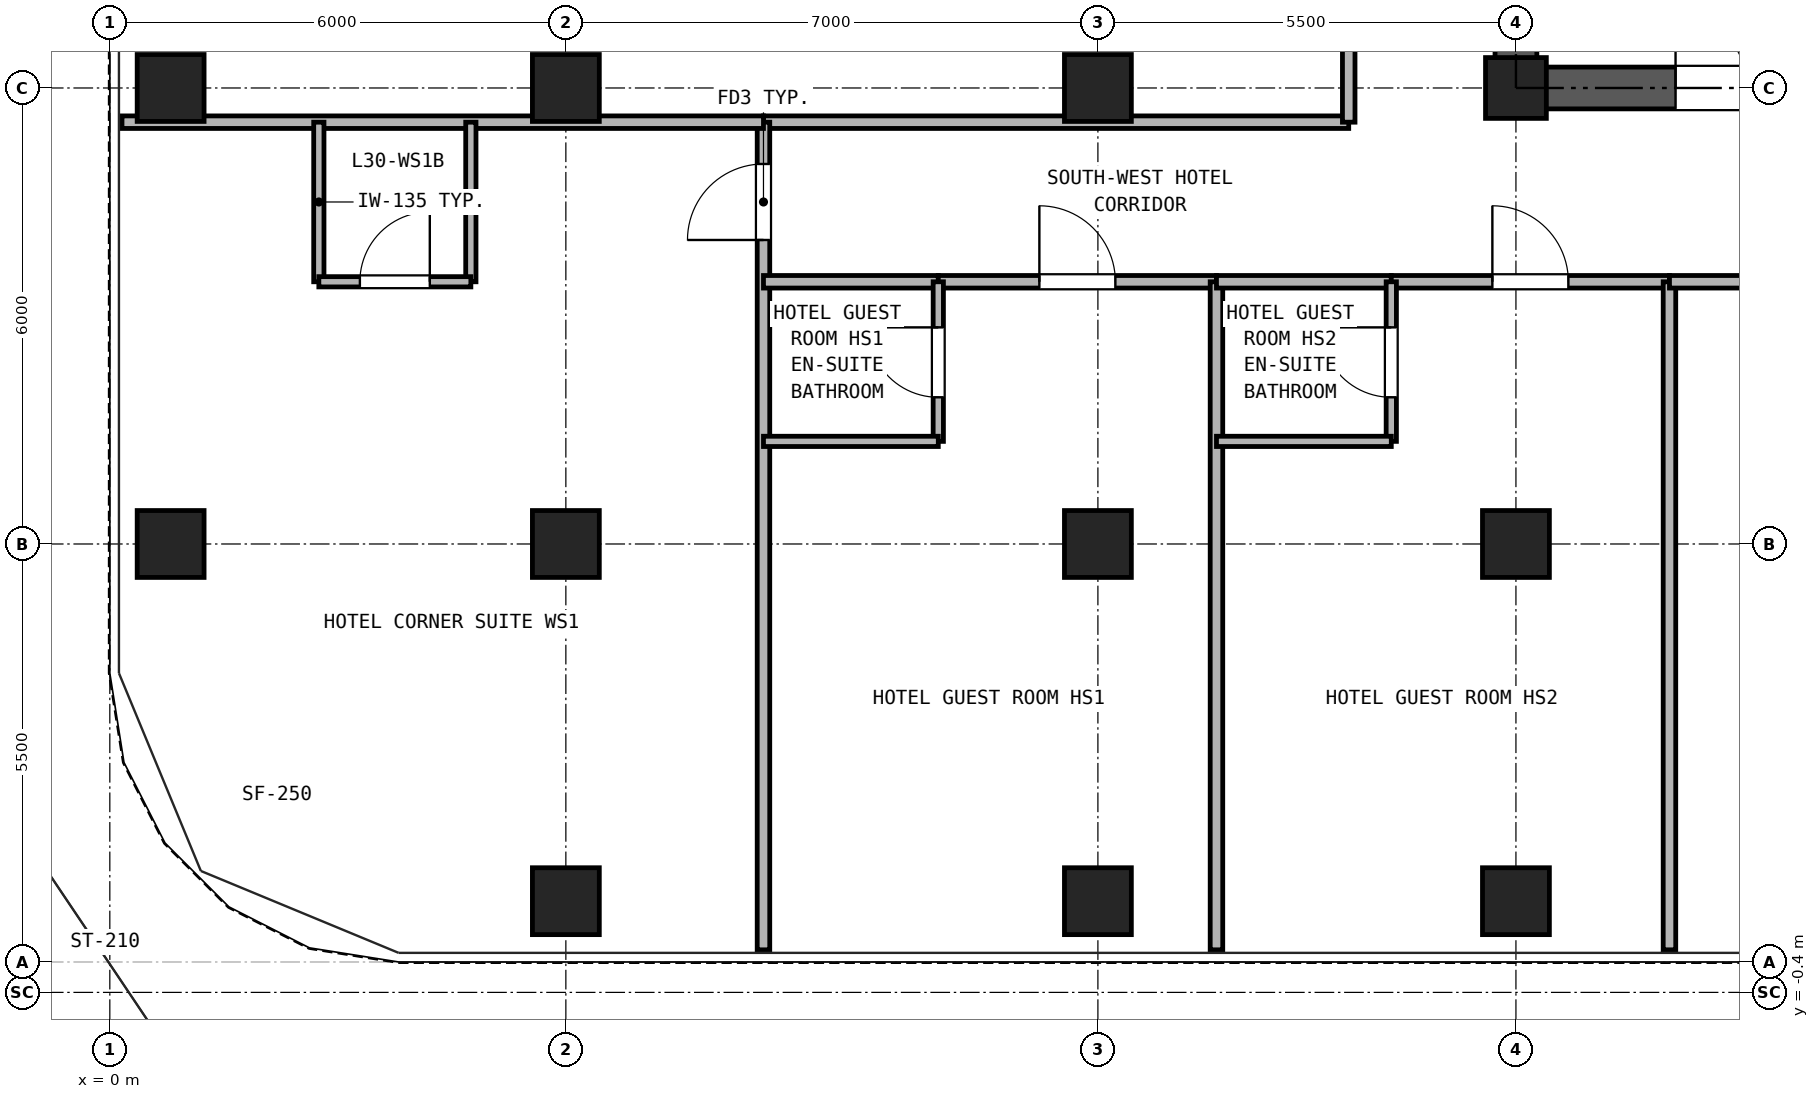
"""IFC4 building model, lengths in metres.
Left out: names, types, materials, properties, quantities, classifications, styles, units other than length and angle.
Written with IfcOpenShell. Run it as: python <this file> out.ifc"""

import sys

from ifc_helpers import new_model, si_unit, direction, frame, frame_2d, origin, origin_2d, place, context, subcontext, project, spatial, rectangle, hollow_rectangle, extrude, source, transform, mapped, element, fill, save


model = new_model("IFC4")
c1 = context("Model", 3, precision=1e-05, world=origin(), true_north=direction((0.0, 1.0)))
c2 = subcontext(c1, "Body", "Model", "MODEL_VIEW")
j1 = project(units=[si_unit("LENGTHUNIT", "METRE"), si_unit("PLANEANGLEUNIT", "RADIAN")], contexts=[c1])
p1 = place(None, origin())
s1 = spatial("IfcSite", under=j1, at=p1, CompositionType="ELEMENT")
p2 = place(p1, origin())
s2 = spatial("IfcBuilding", under=s1, at=p2, CompositionType="ELEMENT")
p3 = place(p2, frame((0.0, 0.0, 111.9)))
s3 = spatial("IfcBuildingStorey", under=s2, at=p3, CompositionType="ELEMENT", Elevation=111.9)
m1 = source(origin(), c2, "Body", "SweptSolid", [
    extrude(hollow_rectangle(XDim=0.88, YDim=0.88, WallThickness=0.05, at=origin_2d()), origin(), (0.0, 0.0, 1.0), 2.95),
])
for number, where, z_axis, x_axis in (
    (1, (6.0, 0.8, 0.0), (0.0, 0.0, 1.0), (1.0, 0.0, 0.0)),
    (2, (13.0, 0.8, 0.0), (0.0, 0.0, 1.0), (1.0, 0.0, 0.0)),
    (3, (18.5, 0.8, 0.0), (0.0, 0.0, 1.0), (1.0, 0.0, 0.0)),
    (4, (0.8, 5.5, 0.0), (0.0, 0.0, 1.0), (1.0, 0.0, 0.0)),
    (5, (0.8, 11.5, 0.0), (0.0, 0.0, 1.0), (1.0, 0.0, 0.0)),
    (6, (6.0, 5.5, 0.0), (0.0, 0.0, 1.0), (1.0, 0.0, 0.0)),
    (7, (6.0, 11.5, 0.0), (0.0, 0.0, 1.0), (1.0, 0.0, 0.0)),
    (8, (13.0, 5.5, 0.0), (0.0, 0.0, 1.0), (1.0, 0.0, 0.0)),
    (9, (13.0, 11.5, 0.0), (0.0, 0.0, 1.0), (1.0, 0.0, 0.0)),
    (10, (18.5, 5.5, 0.0), (0.0, 0.0, 1.0), (1.0, 0.0, 0.0)),
):
    element("IfcColumn", number, at=place(p3, frame(where, z_axis=z_axis, x_axis=x_axis)), inside=s3, PredefinedType="COLUMN", context=c2, shape_type="MappedRepresentation", body=[
        mapped(m1, transform((0.0, 0.0, 0.0), x_axis=(1.0, 0.0, 0.0), y_axis=(0.0, 1.0, 0.0), z_axis=(0.0, 0.0, 1.0), scale=1.0)),
    ])
m2 = source(origin(), c2, "Body", "SweptSolid", [
    extrude(hollow_rectangle(XDim=0.8, YDim=0.8, WallThickness=0.045, at=origin_2d()), origin(), (0.0, 0.0, 1.0), 2.95),
])
p4 = place(p3, frame((18.5, 11.5, 0.0), z_axis=(0.0, 0.0, 1.0), x_axis=(1.0, 0.0, 0.0)))
e11 = element("IfcColumn", 11, at=p4, inside=s3, PredefinedType="COLUMN", context=c2, shape_type="MappedRepresentation", body=[
    mapped(m2, transform((0.0, 0.0, 0.0), x_axis=(1.0, 0.0, 0.0), y_axis=(0.0, 1.0, 0.0), z_axis=(0.0, 0.0, 1.0), scale=1.0)),
])
p5 = place(p3, frame((18.225, 11.5, 0.0), z_axis=(0.0, 0.0, 1.0), x_axis=(1.0, 0.0, 0.0)))
e12 = element("IfcWall", 12, at=p5, inside=s3, PredefinedType="SHEAR", context=c2, shape_type="SweptSolid", body=[
    extrude(rectangle(XDim=10.55, YDim=0.55, at=frame_2d((5.275, 0.0))), origin(), (0.0, 0.0, 1.0), 2.95),
])
p6 = place(p5, frame((2.375, 0.0, 0.0)))
e13 = element("IfcOpeningElement", 13, at=p6, cuts=e12, PredefinedType="OPENING", context=c2, shape_type="SweptSolid", body=[
    extrude(rectangle(XDim=0.95, YDim=2.15, at=frame_2d((0.475, 1.075))), frame((0.0, 0.285, 0.0), z_axis=(0.0, -1.0, 0.0), x_axis=(1.0, 0.0, 0.0)), (0.0, 0.0, 1.0), 0.57),
])
p7 = place(p5, frame((5.875, 0.0, 0.0)))
e14 = element("IfcOpeningElement", 14, at=p7, cuts=e12, PredefinedType="OPENING", context=c2, shape_type="SweptSolid", body=[
    extrude(rectangle(XDim=1.1, YDim=2.25, at=frame_2d((0.55, 1.125))), frame((0.0, 0.285, 0.0), z_axis=(0.0, -1.0, 0.0), x_axis=(1.0, 0.0, 0.0)), (0.0, 0.0, 1.0), 0.57),
])
p8 = place(p5, frame((8.275, 0.0, 0.0)))
e15 = element("IfcOpeningElement", 15, at=p8, cuts=e12, PredefinedType="OPENING", context=c2, shape_type="SweptSolid", body=[
    extrude(rectangle(XDim=1.1, YDim=2.25, at=frame_2d((0.55, 1.125))), frame((0.0, 0.285, 0.0), z_axis=(0.0, -1.0, 0.0), x_axis=(1.0, 0.0, 0.0)), (0.0, 0.0, 1.0), 0.57),
])
p9 = place(p3, frame((18.5, 11.775, 0.0), z_axis=(0.0, 0.0, 1.0), x_axis=(0.0, 1.0, 0.0)))
e16 = element("IfcWall", 16, at=p9, inside=s3, PredefinedType="SHEAR", context=c2, shape_type="SweptSolid", body=[
    extrude(rectangle(XDim=16.7, YDim=0.55, at=frame_2d((8.35, 0.0))), origin(), (0.0, 0.0, 1.0), 2.95),
])
p10 = place(p9, frame((7.375, 0.0, 0.0)))
e17 = element("IfcOpeningElement", 17, at=p10, cuts=e16, PredefinedType="OPENING", context=c2, shape_type="SweptSolid", body=[
    extrude(rectangle(XDim=1.15, YDim=2.2, at=frame_2d((0.575, 1.1))), frame((0.0, 0.285, 0.0), z_axis=(0.0, -1.0, 0.0), x_axis=(1.0, 0.0, 0.0)), (0.0, 0.0, 1.0), 0.57),
])
p11 = place(p3, frame((8.6, 11.05, 0.0), z_axis=(0.0, 0.0, 1.0), x_axis=(1.0, 0.0, 0.0)))
e18 = element("IfcWall", 18, at=p11, inside=s3, PredefinedType="PARTITIONING", context=c2, shape_type="SweptSolid", body=[
    extrude(rectangle(XDim=7.7, YDim=0.165, at=frame_2d((3.85, 0.0))), origin(), (0.0, 0.0, 1.0), 2.95),
])
p12 = place(p3, frame((16.3, 11.05, 0.0), z_axis=(0.0, 0.0, 1.0), x_axis=(0.0, 1.0, 0.0)))
e19 = element("IfcWall", 19, at=p12, inside=s3, PredefinedType="PARTITIONING", context=c2, shape_type="SweptSolid", body=[
    extrude(rectangle(XDim=18.15, YDim=0.165, at=frame_2d((9.075, 0.0))), origin(), (0.0, 0.0, 1.0), 2.95),
])
p13 = place(p12, frame((4.037, 0.0, 0.0)))
e20 = element("IfcOpeningElement", 20, at=p13, cuts=e19, PredefinedType="OPENING", context=c2, shape_type="SweptSolid", body=[
    extrude(rectangle(XDim=0.95, YDim=2.15, at=frame_2d((0.475, 1.075))), frame((0.0, 0.093, 0.0), z_axis=(0.0, -1.0, 0.0), x_axis=(1.0, 0.0, 0.0)), (0.0, 0.0, 1.0), 0.185),
])
p14 = place(p12, frame((13.113, 0.0, 0.0)))
e21 = element("IfcOpeningElement", 21, at=p14, cuts=e19, PredefinedType="OPENING", context=c2, shape_type="SweptSolid", body=[
    extrude(rectangle(XDim=0.95, YDim=2.15, at=frame_2d((0.475, 1.075))), frame((0.0, 0.093, 0.0), z_axis=(0.0, -1.0, 0.0), x_axis=(1.0, 0.0, 0.0)), (0.0, 0.0, 1.0), 0.185),
])
p15 = place(p3, frame((8.6, 0.16, 0.0), z_axis=(0.0, 0.0, 1.0), x_axis=(0.0, 1.0, 0.0)))
e22 = element("IfcWall", 22, at=p15, inside=s3, PredefinedType="PARTITIONING", context=c2, shape_type="SweptSolid", body=[
    extrude(rectangle(XDim=10.89, YDim=0.165, at=frame_2d((5.445, 0.0))), origin(), (0.0, 0.0, 1.0), 2.95),
])
p16 = place(p15, frame((9.34, 0.0, 0.0)))
e23 = element("IfcOpeningElement", 23, at=p16, cuts=e22, PredefinedType="OPENING", context=c2, shape_type="SweptSolid", body=[
    extrude(rectangle(XDim=1.0, YDim=2.15, at=frame_2d((0.5, 1.075))), frame((0.0, 0.093, 0.0), z_axis=(0.0, -1.0, 0.0), x_axis=(1.0, 0.0, 0.0)), (0.0, 0.0, 1.0), 0.185),
])
p17 = place(p3, frame((0.16, 11.05, 0.0), z_axis=(0.0, 0.0, 1.0), x_axis=(1.0, 0.0, 0.0)))
e24 = element("IfcWall", 24, at=p17, inside=s3, PredefinedType="PARTITIONING", context=c2, shape_type="SweptSolid", body=[
    extrude(rectangle(XDim=8.44, YDim=0.165, at=frame_2d((4.22, 0.0))), origin(), (0.0, 0.0, 1.0), 2.95),
])
for number, where, z_axis, x_axis in (
    (25, (2.75, 8.95, 0.0), (0.0, 0.0, 1.0), (0.0, 1.0, 0.0)),
    (26, (4.75, 8.95, 0.0), (0.0, 0.0, 1.0), (0.0, 1.0, 0.0)),
):
    element("IfcWall", number, at=place(p3, frame(where, z_axis=z_axis, x_axis=x_axis)), inside=s3, PredefinedType="PARTITIONING", context=c2, shape_type="SweptSolid", body=[
        extrude(rectangle(XDim=2.1, YDim=0.135, at=frame_2d((1.05, 0.0))), origin(), (0.0, 0.0, 1.0), 2.95),
    ])
p18 = place(p3, frame((2.75, 8.95, 0.0), z_axis=(0.0, 0.0, 1.0), x_axis=(1.0, 0.0, 0.0)))
e27 = element("IfcWall", 27, at=p18, inside=s3, PredefinedType="PARTITIONING", context=c2, shape_type="SweptSolid", body=[
    extrude(rectangle(XDim=2.0, YDim=0.135, at=frame_2d((1.0, 0.0))), origin(), (0.0, 0.0, 1.0), 2.95),
])
p19 = place(p18, frame((0.54, 0.0, 0.0)))
e28 = element("IfcOpeningElement", 28, at=p19, cuts=e27, PredefinedType="OPENING", context=c2, shape_type="SweptSolid", body=[
    extrude(rectangle(XDim=0.92, YDim=2.1, at=frame_2d((0.46, 1.05))), frame((0.0, 0.077, 0.0), z_axis=(0.0, -1.0, 0.0), x_axis=(1.0, 0.0, 0.0)), (0.0, 0.0, 1.0), 0.155),
])
p20 = place(p3, frame((8.6, 8.95, 0.0), z_axis=(0.0, 0.0, 1.0), x_axis=(1.0, 0.0, 0.0)))
e29 = element("IfcWall", 29, at=p20, inside=s3, PredefinedType="PARTITIONING", context=c2, shape_type="SweptSolid", body=[
    extrude(rectangle(XDim=2.3, YDim=0.165, at=frame_2d((1.15, 0.0))), origin(), (0.0, 0.0, 1.0), 2.95),
])
p21 = place(p3, frame((10.9, 8.95, 0.0), z_axis=(0.0, 0.0, 1.0), x_axis=(1.0, 0.0, 0.0)))
e30 = element("IfcWall", 30, at=p21, inside=s3, PredefinedType="PARTITIONING", context=c2, shape_type="SweptSolid", body=[
    extrude(rectangle(XDim=3.66, YDim=0.165, at=frame_2d((1.83, 0.0))), origin(), (0.0, 0.0, 1.0), 2.95),
])
p22 = place(p21, frame((1.33, 0.0, 0.0)))
e31 = element("IfcOpeningElement", 31, at=p22, cuts=e30, PredefinedType="OPENING", context=c2, shape_type="SweptSolid", body=[
    extrude(rectangle(XDim=1.0, YDim=2.15, at=frame_2d((0.5, 1.075))), frame((0.0, 0.093, 0.0), z_axis=(0.0, -1.0, 0.0), x_axis=(1.0, 0.0, 0.0)), (0.0, 0.0, 1.0), 0.185),
])
p23 = place(p3, frame((10.9, 6.85, 0.0), z_axis=(0.0, 0.0, 1.0), x_axis=(0.0, 1.0, 0.0)))
e32 = element("IfcWall", 32, at=p23, inside=s3, PredefinedType="PARTITIONING", context=c2, shape_type="SweptSolid", body=[
    extrude(rectangle(XDim=2.1, YDim=0.135, at=frame_2d((1.05, 0.0))), origin(), (0.0, 0.0, 1.0), 2.95),
])
p24 = place(p23, frame((0.58, 0.0, 0.0)))
e33 = element("IfcOpeningElement", 33, at=p24, cuts=e32, PredefinedType="OPENING", context=c2, shape_type="SweptSolid", body=[
    extrude(rectangle(XDim=0.92, YDim=2.1, at=frame_2d((0.46, 1.05))), frame((0.0, 0.077, 0.0), z_axis=(0.0, -1.0, 0.0), x_axis=(1.0, 0.0, 0.0)), (0.0, 0.0, 1.0), 0.155),
])
p25 = place(p3, frame((8.6, 6.85, 0.0), z_axis=(0.0, 0.0, 1.0), x_axis=(1.0, 0.0, 0.0)))
e34 = element("IfcWall", 34, at=p25, inside=s3, PredefinedType="PARTITIONING", context=c2, shape_type="SweptSolid", body=[
    extrude(rectangle(XDim=2.3, YDim=0.135, at=frame_2d((1.15, 0.0))), origin(), (0.0, 0.0, 1.0), 2.95),
])
p26 = place(p3, frame((14.56, 0.16, 0.0), z_axis=(0.0, 0.0, 1.0), x_axis=(0.0, 1.0, 0.0)))
e35 = element("IfcWall", 35, at=p26, inside=s3, PredefinedType="PARTITIONING", context=c2, shape_type="SweptSolid", body=[
    extrude(rectangle(XDim=8.79, YDim=0.165, at=frame_2d((4.395, 0.0))), origin(), (0.0, 0.0, 1.0), 2.95),
])
p27 = place(p3, frame((14.56, 8.95, 0.0), z_axis=(0.0, 0.0, 1.0), x_axis=(1.0, 0.0, 0.0)))
e36 = element("IfcWall", 36, at=p27, inside=s3, PredefinedType="PARTITIONING", context=c2, shape_type="SweptSolid", body=[
    extrude(rectangle(XDim=2.3, YDim=0.165, at=frame_2d((1.15, 0.0))), origin(), (0.0, 0.0, 1.0), 2.95),
])
p28 = place(p3, frame((16.86, 8.95, 0.0), z_axis=(0.0, 0.0, 1.0), x_axis=(1.0, 0.0, 0.0)))
e37 = element("IfcWall", 37, at=p28, inside=s3, PredefinedType="PARTITIONING", context=c2, shape_type="SweptSolid", body=[
    extrude(rectangle(XDim=3.66, YDim=0.165, at=frame_2d((1.83, 0.0))), origin(), (0.0, 0.0, 1.0), 2.95),
])
p29 = place(p28, frame((1.33, 0.0, 0.0)))
e38 = element("IfcOpeningElement", 38, at=p29, cuts=e37, PredefinedType="OPENING", context=c2, shape_type="SweptSolid", body=[
    extrude(rectangle(XDim=1.0, YDim=2.15, at=frame_2d((0.5, 1.075))), frame((0.0, 0.093, 0.0), z_axis=(0.0, -1.0, 0.0), x_axis=(1.0, 0.0, 0.0)), (0.0, 0.0, 1.0), 0.185),
])
p30 = place(p3, frame((16.86, 6.85, 0.0), z_axis=(0.0, 0.0, 1.0), x_axis=(0.0, 1.0, 0.0)))
e39 = element("IfcWall", 39, at=p30, inside=s3, PredefinedType="PARTITIONING", context=c2, shape_type="SweptSolid", body=[
    extrude(rectangle(XDim=2.1, YDim=0.135, at=frame_2d((1.05, 0.0))), origin(), (0.0, 0.0, 1.0), 2.95),
])
p31 = place(p30, frame((0.58, 0.0, 0.0)))
e40 = element("IfcOpeningElement", 40, at=p31, cuts=e39, PredefinedType="OPENING", context=c2, shape_type="SweptSolid", body=[
    extrude(rectangle(XDim=0.92, YDim=2.1, at=frame_2d((0.46, 1.05))), frame((0.0, 0.077, 0.0), z_axis=(0.0, -1.0, 0.0), x_axis=(1.0, 0.0, 0.0)), (0.0, 0.0, 1.0), 0.155),
])
p32 = place(p3, frame((14.56, 6.85, 0.0), z_axis=(0.0, 0.0, 1.0), x_axis=(1.0, 0.0, 0.0)))
e41 = element("IfcWall", 41, at=p32, inside=s3, PredefinedType="PARTITIONING", context=c2, shape_type="SweptSolid", body=[
    extrude(rectangle(XDim=2.3, YDim=0.135, at=frame_2d((1.15, 0.0))), origin(), (0.0, 0.0, 1.0), 2.95),
])
p33 = place(p3, frame((20.52, 0.16, 0.0), z_axis=(0.0, 0.0, 1.0), x_axis=(0.0, 1.0, 0.0)))
e42 = element("IfcWall", 42, at=p33, inside=s3, PredefinedType="PARTITIONING", context=c2, shape_type="SweptSolid", body=[
    extrude(rectangle(XDim=8.79, YDim=0.165, at=frame_2d((4.395, 0.0))), origin(), (0.0, 0.0, 1.0), 2.95),
])
p34 = place(p3, frame((20.52, 8.95, 0.0), z_axis=(0.0, 0.0, 1.0), x_axis=(1.0, 0.0, 0.0)))
e43 = element("IfcWall", 43, at=p34, inside=s3, PredefinedType="PARTITIONING", context=c2, shape_type="SweptSolid", body=[
    extrude(rectangle(XDim=3.66, YDim=0.165, at=frame_2d((1.83, 0.0))), origin(), (0.0, 0.0, 1.0), 2.95),
])
p35 = place(p34, frame((1.33, 0.0, 0.0)))
e44 = element("IfcOpeningElement", 44, at=p35, cuts=e43, PredefinedType="OPENING", context=c2, shape_type="SweptSolid", body=[
    extrude(rectangle(XDim=1.0, YDim=2.15, at=frame_2d((0.5, 1.075))), frame((0.0, 0.093, 0.0), z_axis=(0.0, -1.0, 0.0), x_axis=(1.0, 0.0, 0.0)), (0.0, 0.0, 1.0), 0.185),
])
p36 = place(p6, frame((0.95, 0.0, 0.0), z_axis=(0.0, 0.0, 1.0), x_axis=(-1.0, 0.0, 0.0)))
e45 = element("IfcDoor", 45, at=p36, inside=s3, OperationType="SINGLE_SWING_LEFT", PredefinedType="DOOR", context=c2, shape_type="SweptSolid", body=[
    extrude(rectangle(XDim=0.95, YDim=2.15, at=frame_2d((0.475, 1.075))), frame((0.0, 0.025, 0.0), z_axis=(0.0, -1.0, 0.0), x_axis=(1.0, 0.0, 0.0)), (0.0, 0.0, 1.0), 0.05),
])
fill(e13, e45)
p37 = place(p19, origin())
e46 = element("IfcDoor", 46, at=p37, inside=s3, OperationType="SINGLE_SWING_RIGHT", PredefinedType="DOOR", context=c2, shape_type="SweptSolid", body=[
    extrude(rectangle(XDim=0.92, YDim=2.1, at=frame_2d((0.46, 1.05))), frame((0.0, 0.025, 0.0), z_axis=(0.0, -1.0, 0.0), x_axis=(1.0, 0.0, 0.0)), (0.0, 0.0, 1.0), 0.05),
])
fill(e28, e46)
p38 = place(p16, origin())
e47 = element("IfcDoor", 47, at=p38, inside=s3, OperationType="SINGLE_SWING_LEFT", PredefinedType="DOOR", context=c2, shape_type="SweptSolid", body=[
    extrude(rectangle(XDim=1.0, YDim=2.15, at=frame_2d((0.5, 1.075))), frame((0.0, 0.025, 0.0), z_axis=(0.0, -1.0, 0.0), x_axis=(1.0, 0.0, 0.0)), (0.0, 0.0, 1.0), 0.05),
])
fill(e23, e47)
p39 = place(p24, frame((0.92, 0.0, 0.0), z_axis=(0.0, 0.0, 1.0), x_axis=(-1.0, 0.0, 0.0)))
e48 = element("IfcDoor", 48, at=p39, inside=s3, OperationType="SINGLE_SWING_RIGHT", PredefinedType="DOOR", context=c2, shape_type="SweptSolid", body=[
    extrude(rectangle(XDim=0.92, YDim=2.1, at=frame_2d((0.46, 1.05))), frame((0.0, 0.025, 0.0), z_axis=(0.0, -1.0, 0.0), x_axis=(1.0, 0.0, 0.0)), (0.0, 0.0, 1.0), 0.05),
])
fill(e33, e48)
p40 = place(p22, frame((1.0, 0.0, 0.0), z_axis=(0.0, 0.0, 1.0), x_axis=(-1.0, 0.0, 0.0)))
e49 = element("IfcDoor", 49, at=p40, inside=s3, OperationType="SINGLE_SWING_LEFT", PredefinedType="DOOR", context=c2, shape_type="SweptSolid", body=[
    extrude(rectangle(XDim=1.0, YDim=2.15, at=frame_2d((0.5, 1.075))), frame((0.0, 0.025, 0.0), z_axis=(0.0, -1.0, 0.0), x_axis=(1.0, 0.0, 0.0)), (0.0, 0.0, 1.0), 0.05),
])
fill(e31, e49)
p41 = place(p31, frame((0.92, 0.0, 0.0), z_axis=(0.0, 0.0, 1.0), x_axis=(-1.0, 0.0, 0.0)))
e50 = element("IfcDoor", 50, at=p41, inside=s3, OperationType="SINGLE_SWING_RIGHT", PredefinedType="DOOR", context=c2, shape_type="SweptSolid", body=[
    extrude(rectangle(XDim=0.92, YDim=2.1, at=frame_2d((0.46, 1.05))), frame((0.0, 0.025, 0.0), z_axis=(0.0, -1.0, 0.0), x_axis=(1.0, 0.0, 0.0)), (0.0, 0.0, 1.0), 0.05),
])
fill(e40, e50)
p42 = place(p29, frame((1.0, 0.0, 0.0), z_axis=(0.0, 0.0, 1.0), x_axis=(-1.0, 0.0, 0.0)))
e51 = element("IfcDoor", 51, at=p42, inside=s3, OperationType="SINGLE_SWING_LEFT", PredefinedType="DOOR", context=c2, shape_type="SweptSolid", body=[
    extrude(rectangle(XDim=1.0, YDim=2.15, at=frame_2d((0.5, 1.075))), frame((0.0, 0.025, 0.0), z_axis=(0.0, -1.0, 0.0), x_axis=(1.0, 0.0, 0.0)), (0.0, 0.0, 1.0), 0.05),
])
fill(e38, e51)
save(model, sys.argv[1])
